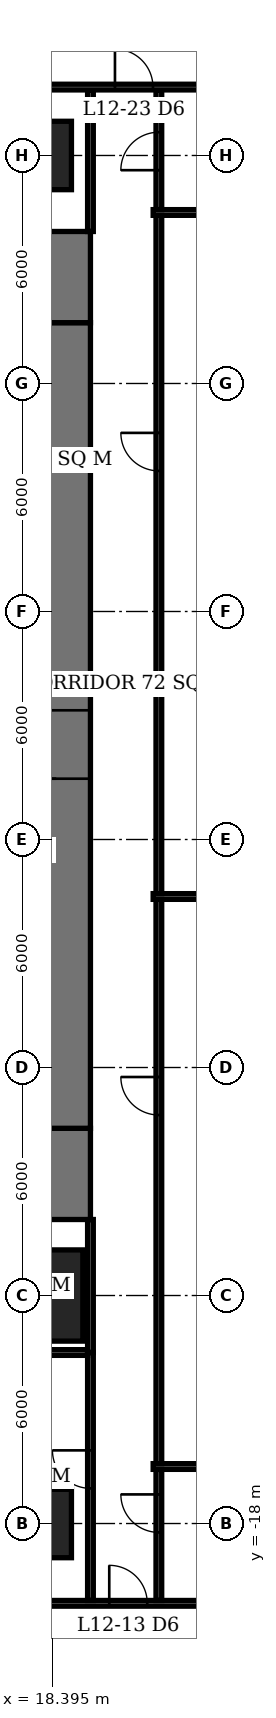
"""IFC4 building model, lengths in metres.
Left out: names, types, materials, properties, quantities, classifications, styles, units other than length and angle.
Written with IfcOpenShell. Run it as: python <this file> out.ifc"""

import sys

from ifc_helpers import new_model, si_unit, direction, frame, frame_2d, origin, origin_2d, place, context, subcontext, project, spatial, rectangle, extrude, element, fill, save


model = new_model("IFC4")
c1 = context("Model", 3, precision=1e-05, world=origin(), true_north=direction((0.0, 1.0)))
c2 = subcontext(c1, "Body", "Model", "MODEL_VIEW")
j1 = project(units=[si_unit("LENGTHUNIT", "METRE"), si_unit("PLANEANGLEUNIT", "RADIAN")], contexts=[c1])
p1 = place(None, origin())
s1 = spatial("IfcSite", under=j1, at=p1, CompositionType="ELEMENT")
p2 = place(p1, origin())
s2 = spatial("IfcBuilding", under=s1, at=p2, CompositionType="ELEMENT")
p3 = place(p2, frame((0.0, 0.0, 53.3)))
s3 = spatial("IfcBuildingStorey", under=s2, at=p3, CompositionType="ELEMENT", Elevation=53.3)
p4 = place(p3, frame((18.0, -18.0, 0.0), z_axis=(0.0, 0.0, 1.0), x_axis=(1.0, 0.0, 0.0)))
e1 = element("IfcColumn", 1, at=p4, inside=s3, PredefinedType="COLUMN", context=c2, shape_type="SweptSolid", body=[
    extrude(rectangle(XDim=1.8, YDim=1.8, at=origin_2d()), origin(), (0.0, 0.0, 1.0), 3.9),
])
p5 = place(p3, frame((18.0, -12.0, 0.0), z_axis=(0.0, 0.0, 1.0), x_axis=(1.0, 0.0, 0.0)))
e2 = element("IfcColumn", 2, at=p5, inside=s3, PredefinedType="COLUMN", context=c2, shape_type="SweptSolid", body=[
    extrude(rectangle(XDim=2.4, YDim=2.4, at=origin_2d()), origin(), (0.0, 0.0, 1.0), 3.9),
])
p6 = place(p3, frame((18.0, 18.0, 0.0), z_axis=(0.0, 0.0, 1.0), x_axis=(1.0, 0.0, 0.0)))
e3 = element("IfcColumn", 3, at=p6, inside=s3, PredefinedType="COLUMN", context=c2, shape_type="SweptSolid", body=[
    extrude(rectangle(XDim=1.8, YDim=1.8, at=origin_2d()), origin(), (0.0, 0.0, 1.0), 3.9),
])
p7 = place(p3, frame((18.5, -7.6, 0.0), z_axis=(0.0, 0.0, 1.0), x_axis=(0.0, 1.0, 0.0)))
e4 = element("IfcWall", 4, at=p7, inside=s3, PredefinedType="SHEAR", context=c2, shape_type="SweptSolid", body=[
    extrude(rectangle(XDim=21.2, YDim=1.8, at=frame_2d((10.6, 0.0))), origin(), (0.0, 0.0, 1.0), 3.9),
])
p8 = place(p7, frame((9.2, 0.0, 0.0)))
e5 = element("IfcOpeningElement", 5, at=p8, cuts=e4, PredefinedType="OPENING", context=c2, shape_type="SweptSolid", body=[
    extrude(rectangle(XDim=1.8, YDim=2.4, at=frame_2d((0.9, 1.2))), frame((0.0, 0.91, 0.0), z_axis=(0.0, -1.0, 0.0), x_axis=(1.0, 0.0, 0.0)), (0.0, 0.0, 1.0), 1.82),
])
for number, where, z_axis, x_axis in (
    (6, (18.5, -10.0, 0.0), (0.0, 0.0, 1.0), (0.0, 1.0, 0.0)),
    (7, (18.5, 13.6, 0.0), (0.0, 0.0, 1.0), (0.0, 1.0, 0.0)),
):
    element("IfcWall", number, at=place(p3, frame(where, z_axis=z_axis, x_axis=x_axis)), inside=s3, PredefinedType="SHEAR", context=c2, shape_type="SweptSolid", body=[
        extrude(rectangle(XDim=2.4, YDim=1.8, at=frame_2d((1.2, 0.0))), origin(), (0.0, 0.0, 1.0), 3.9),
    ])
p9 = place(p3, frame((18.075, -20.1, 0.0), z_axis=(0.0, 0.0, 1.0), x_axis=(1.0, 0.0, 0.0)))
e8 = element("IfcWall", 8, at=p9, inside=s3, PredefinedType="PARTITIONING", context=c2, shape_type="SweptSolid", body=[
    extrude(rectangle(XDim=4.715, YDim=0.15, at=frame_2d((2.357, 0.0))), origin(), (0.0, 0.0, 1.0), 3.65),
])
p10 = place(p9, frame((1.82, 0.0, 0.0)))
e9 = element("IfcOpeningElement", 9, at=p10, cuts=e8, PredefinedType="OPENING", context=c2, shape_type="SweptSolid", body=[
    extrude(rectangle(XDim=1.0, YDim=2.1, at=frame_2d((0.5, 1.05))), frame((0.0, 0.085, 0.0), z_axis=(0.0, -1.0, 0.0), x_axis=(1.0, 0.0, 0.0)), (0.0, 0.0, 1.0), 0.17),
])
p11 = place(p3, frame((18.075, 19.8, 0.0), z_axis=(0.0, 0.0, 1.0), x_axis=(1.0, 0.0, 0.0)))
e10 = element("IfcWall", 10, at=p11, inside=s3, PredefinedType="PARTITIONING", context=c2, shape_type="SweptSolid", body=[
    extrude(rectangle(XDim=5.015, YDim=0.15, at=frame_2d((2.508, 0.0))), origin(), (0.0, 0.0, 1.0), 3.65),
])
p12 = place(p11, frame((1.97, 0.0, 0.0)))
e11 = element("IfcOpeningElement", 11, at=p12, cuts=e10, PredefinedType="OPENING", context=c2, shape_type="SweptSolid", body=[
    extrude(rectangle(XDim=1.0, YDim=2.1, at=frame_2d((0.5, 1.05))), frame((0.0, 0.085, 0.0), z_axis=(0.0, -1.0, 0.0), x_axis=(1.0, 0.0, 0.0)), (0.0, 0.0, 1.0), 0.17),
])
p13 = place(p3, frame((19.325, -13.5, 0.0), z_axis=(0.0, 0.0, 1.0), x_axis=(-1.0, 0.0, 0.0)))
e12 = element("IfcWall", 12, at=p13, inside=s3, PredefinedType="PARTITIONING", context=c2, shape_type="SweptSolid", body=[
    extrude(rectangle(XDim=8.75, YDim=0.15, at=frame_2d((4.375, 0.0))), origin(), (0.0, 0.0, 1.0), 3.65),
])
p14 = place(p13, frame((2.375, 0.0, 0.0)))
e13 = element("IfcOpeningElement", 13, at=p14, cuts=e12, PredefinedType="OPENING", context=c2, shape_type="SweptSolid", body=[
    extrude(rectangle(XDim=1.0, YDim=2.1, at=frame_2d((0.5, 1.05))), frame((0.0, 0.085, 0.0), z_axis=(0.0, -1.0, 0.0), x_axis=(1.0, 0.0, 0.0)), (0.0, 0.0, 1.0), 0.17),
])
p15 = place(p3, frame((19.4, -20.025, 0.0), z_axis=(0.0, 0.0, 1.0), x_axis=(0.0, 1.0, 0.0)))
e14 = element("IfcWall", 14, at=p15, inside=s3, PredefinedType="PARTITIONING", context=c2, shape_type="SweptSolid", body=[
    extrude(rectangle(XDim=6.525, YDim=0.15, at=frame_2d((3.262, 0.0))), origin(), (0.0, 0.0, 1.0), 3.65),
])
p16 = place(p15, frame((2.95, 0.0, 0.0)))
e15 = element("IfcOpeningElement", 15, at=p16, cuts=e14, PredefinedType="OPENING", context=c2, shape_type="SweptSolid", body=[
    extrude(rectangle(XDim=1.0, YDim=2.1, at=frame_2d((0.5, 1.05))), frame((0.0, 0.085, 0.0), z_axis=(0.0, -1.0, 0.0), x_axis=(1.0, 0.0, 0.0)), (0.0, 0.0, 1.0), 0.17),
])
p17 = place(p3, frame((19.4, -13.5, 0.0), z_axis=(0.0, 0.0, 1.0), x_axis=(0.0, 1.0, 0.0)))
e16 = element("IfcWall", 16, at=p17, inside=s3, PredefinedType="PARTITIONING", context=c2, shape_type="SweptSolid", body=[
    extrude(rectangle(XDim=3.5, YDim=0.15, at=frame_2d((1.75, 0.0))), origin(), (0.0, 0.0, 1.0), 3.65),
])
p18 = place(p3, frame((19.4, 16.0, 0.0), z_axis=(0.0, 0.0, 1.0), x_axis=(0.0, 1.0, 0.0)))
e17 = element("IfcWall", 17, at=p18, inside=s3, PredefinedType="PARTITIONING", context=c2, shape_type="SweptSolid", body=[
    extrude(rectangle(XDim=3.725, YDim=0.15, at=frame_2d((1.863, 0.0))), origin(), (0.0, 0.0, 1.0), 3.65),
])
p19 = place(p3, frame((21.2, -20.025, 0.0), z_axis=(0.0, 0.0, 1.0), x_axis=(0.0, 1.0, 0.0)))
e18 = element("IfcWall", 18, at=p19, inside=s3, PredefinedType="PARTITIONING", context=c2, shape_type="SweptSolid", body=[
    extrude(rectangle(XDim=3.45, YDim=0.15, at=frame_2d((1.725, 0.0))), origin(), (0.0, 0.0, 1.0), 3.65),
])
p20 = place(p19, frame((1.791, 0.0, 0.0)))
e19 = element("IfcOpeningElement", 19, at=p20, cuts=e18, PredefinedType="OPENING", context=c2, shape_type="SweptSolid", body=[
    extrude(rectangle(XDim=1.0, YDim=2.1, at=frame_2d((0.5, 1.05))), frame((0.0, 0.085, 0.0), z_axis=(0.0, -1.0, 0.0), x_axis=(1.0, 0.0, 0.0)), (0.0, 0.0, 1.0), 0.17),
])
p21 = place(p3, frame((21.2, -16.425, 0.0), z_axis=(0.0, 0.0, 1.0), x_axis=(0.0, 1.0, 0.0)))
e20 = element("IfcWall", 20, at=p21, inside=s3, PredefinedType="PARTITIONING", context=c2, shape_type="SweptSolid", body=[
    extrude(rectangle(XDim=14.85, YDim=0.15, at=frame_2d((7.425, 0.0))), origin(), (0.0, 0.0, 1.0), 3.65),
])
p22 = place(p21, frame((9.175, 0.0, 0.0)))
e21 = element("IfcOpeningElement", 21, at=p22, cuts=e20, PredefinedType="OPENING", context=c2, shape_type="SweptSolid", body=[
    extrude(rectangle(XDim=1.0, YDim=2.1, at=frame_2d((0.5, 1.05))), frame((0.0, 0.085, 0.0), z_axis=(0.0, -1.0, 0.0), x_axis=(1.0, 0.0, 0.0)), (0.0, 0.0, 1.0), 0.17),
])
p23 = place(p3, frame((21.05, -16.5, 0.0), z_axis=(0.0, 0.0, 1.0), x_axis=(1.0, 0.0, 0.0)))
e22 = element("IfcWall", 22, at=p23, inside=s3, PredefinedType="PARTITIONING", context=c2, shape_type="SweptSolid", body=[
    extrude(rectangle(XDim=6.54, YDim=0.15, at=frame_2d((3.27, 0.0))), origin(), (0.0, 0.0, 1.0), 3.65),
])
p24 = place(p3, frame((21.2, -1.425, 0.0), z_axis=(0.0, 0.0, 1.0), x_axis=(0.0, 1.0, 0.0)))
e23 = element("IfcWall", 23, at=p24, inside=s3, PredefinedType="PARTITIONING", context=c2, shape_type="SweptSolid", body=[
    extrude(rectangle(XDim=17.85, YDim=0.15, at=frame_2d((8.925, 0.0))), origin(), (0.0, 0.0, 1.0), 3.65),
])
p25 = place(p24, frame((11.125, 0.0, 0.0)))
e24 = element("IfcOpeningElement", 24, at=p25, cuts=e23, PredefinedType="OPENING", context=c2, shape_type="SweptSolid", body=[
    extrude(rectangle(XDim=1.0, YDim=2.1, at=frame_2d((0.5, 1.05))), frame((0.0, 0.085, 0.0), z_axis=(0.0, -1.0, 0.0), x_axis=(1.0, 0.0, 0.0)), (0.0, 0.0, 1.0), 0.17),
])
p26 = place(p3, frame((21.05, -1.5, 0.0), z_axis=(0.0, 0.0, 1.0), x_axis=(1.0, 0.0, 0.0)))
e25 = element("IfcWall", 25, at=p26, inside=s3, PredefinedType="PARTITIONING", context=c2, shape_type="SweptSolid", body=[
    extrude(rectangle(XDim=2.875, YDim=0.15, at=frame_2d((1.438, 0.0))), origin(), (0.0, 0.0, 1.0), 3.65),
])
p27 = place(p3, frame((21.2, 16.575, 0.0), z_axis=(0.0, 0.0, 1.0), x_axis=(0.0, 1.0, 0.0)))
e26 = element("IfcWall", 26, at=p27, inside=s3, PredefinedType="PARTITIONING", context=c2, shape_type="SweptSolid", body=[
    extrude(rectangle(XDim=3.15, YDim=0.15, at=frame_2d((1.575, 0.0))), origin(), (0.0, 0.0, 1.0), 3.65),
])
p28 = place(p27, frame((1.038, 0.0, 0.0)))
e27 = element("IfcOpeningElement", 27, at=p28, cuts=e26, PredefinedType="OPENING", context=c2, shape_type="SweptSolid", body=[
    extrude(rectangle(XDim=1.0, YDim=2.1, at=frame_2d((0.5, 1.05))), frame((0.0, 0.085, 0.0), z_axis=(0.0, -1.0, 0.0), x_axis=(1.0, 0.0, 0.0)), (0.0, 0.0, 1.0), 0.17),
])
p29 = place(p3, frame((21.05, 16.5, 0.0), z_axis=(0.0, 0.0, 1.0), x_axis=(1.0, 0.0, 0.0)))
e28 = element("IfcWall", 28, at=p29, inside=s3, PredefinedType="PARTITIONING", context=c2, shape_type="SweptSolid", body=[
    extrude(rectangle(XDim=6.54, YDim=0.15, at=frame_2d((3.27, 0.0))), origin(), (0.0, 0.0, 1.0), 3.65),
])
p30 = place(p8, origin())
e29 = element("IfcDoor", 29, at=p30, inside=s3, OperationType="DOUBLE_DOOR_SINGLE_SWING", PredefinedType="DOOR", context=c2, shape_type="SweptSolid", body=[
    extrude(rectangle(XDim=1.8, YDim=2.4, at=frame_2d((0.9, 1.2))), frame((0.0, 0.025, 0.0), z_axis=(0.0, -1.0, 0.0), x_axis=(1.0, 0.0, 0.0)), (0.0, 0.0, 1.0), 0.05),
])
fill(e5, e29)
p31 = place(p10, origin())
e30 = element("IfcDoor", 30, at=p31, inside=s3, OperationType="SINGLE_SWING_LEFT", PredefinedType="DOOR", context=c2, shape_type="SweptSolid", body=[
    extrude(rectangle(XDim=1.0, YDim=2.1, at=frame_2d((0.5, 1.05))), frame((0.0, 0.025, 0.0), z_axis=(0.0, -1.0, 0.0), x_axis=(1.0, 0.0, 0.0)), (0.0, 0.0, 1.0), 0.05),
])
fill(e9, e30)
p32 = place(p12, origin())
e31 = element("IfcDoor", 31, at=p32, inside=s3, OperationType="SINGLE_SWING_LEFT", PredefinedType="DOOR", context=c2, shape_type="SweptSolid", body=[
    extrude(rectangle(XDim=1.0, YDim=2.1, at=frame_2d((0.5, 1.05))), frame((0.0, 0.025, 0.0), z_axis=(0.0, -1.0, 0.0), x_axis=(1.0, 0.0, 0.0)), (0.0, 0.0, 1.0), 0.05),
])
fill(e11, e31)
p33 = place(p20, origin())
e32 = element("IfcDoor", 32, at=p33, inside=s3, OperationType="SINGLE_SWING_RIGHT", PredefinedType="DOOR", context=c2, shape_type="SweptSolid", body=[
    extrude(rectangle(XDim=1.0, YDim=2.1, at=frame_2d((0.5, 1.05))), frame((0.0, 0.025, 0.0), z_axis=(0.0, -1.0, 0.0), x_axis=(1.0, 0.0, 0.0)), (0.0, 0.0, 1.0), 0.05),
])
fill(e19, e32)
p34 = place(p22, origin())
e33 = element("IfcDoor", 33, at=p34, inside=s3, OperationType="SINGLE_SWING_RIGHT", PredefinedType="DOOR", context=c2, shape_type="SweptSolid", body=[
    extrude(rectangle(XDim=1.0, YDim=2.1, at=frame_2d((0.5, 1.05))), frame((0.0, 0.025, 0.0), z_axis=(0.0, -1.0, 0.0), x_axis=(1.0, 0.0, 0.0)), (0.0, 0.0, 1.0), 0.05),
])
fill(e21, e33)
p35 = place(p25, origin())
e34 = element("IfcDoor", 34, at=p35, inside=s3, OperationType="SINGLE_SWING_RIGHT", PredefinedType="DOOR", context=c2, shape_type="SweptSolid", body=[
    extrude(rectangle(XDim=1.0, YDim=2.1, at=frame_2d((0.5, 1.05))), frame((0.0, 0.025, 0.0), z_axis=(0.0, -1.0, 0.0), x_axis=(1.0, 0.0, 0.0)), (0.0, 0.0, 1.0), 0.05),
])
fill(e24, e34)
p36 = place(p28, origin())
e35 = element("IfcDoor", 35, at=p36, inside=s3, OperationType="SINGLE_SWING_LEFT", PredefinedType="DOOR", context=c2, shape_type="SweptSolid", body=[
    extrude(rectangle(XDim=1.0, YDim=2.1, at=frame_2d((0.5, 1.05))), frame((0.0, 0.025, 0.0), z_axis=(0.0, -1.0, 0.0), x_axis=(1.0, 0.0, 0.0)), (0.0, 0.0, 1.0), 0.05),
])
fill(e27, e35)
p37 = place(p16, origin())
e36 = element("IfcDoor", 36, at=p37, inside=s3, OperationType="SINGLE_SWING_RIGHT", PredefinedType="DOOR", context=c2, shape_type="SweptSolid", body=[
    extrude(rectangle(XDim=1.0, YDim=2.1, at=frame_2d((0.5, 1.05))), frame((0.0, 0.025, 0.0), z_axis=(0.0, -1.0, 0.0), x_axis=(1.0, 0.0, 0.0)), (0.0, 0.0, 1.0), 0.05),
])
fill(e15, e36)
save(model, sys.argv[1])
